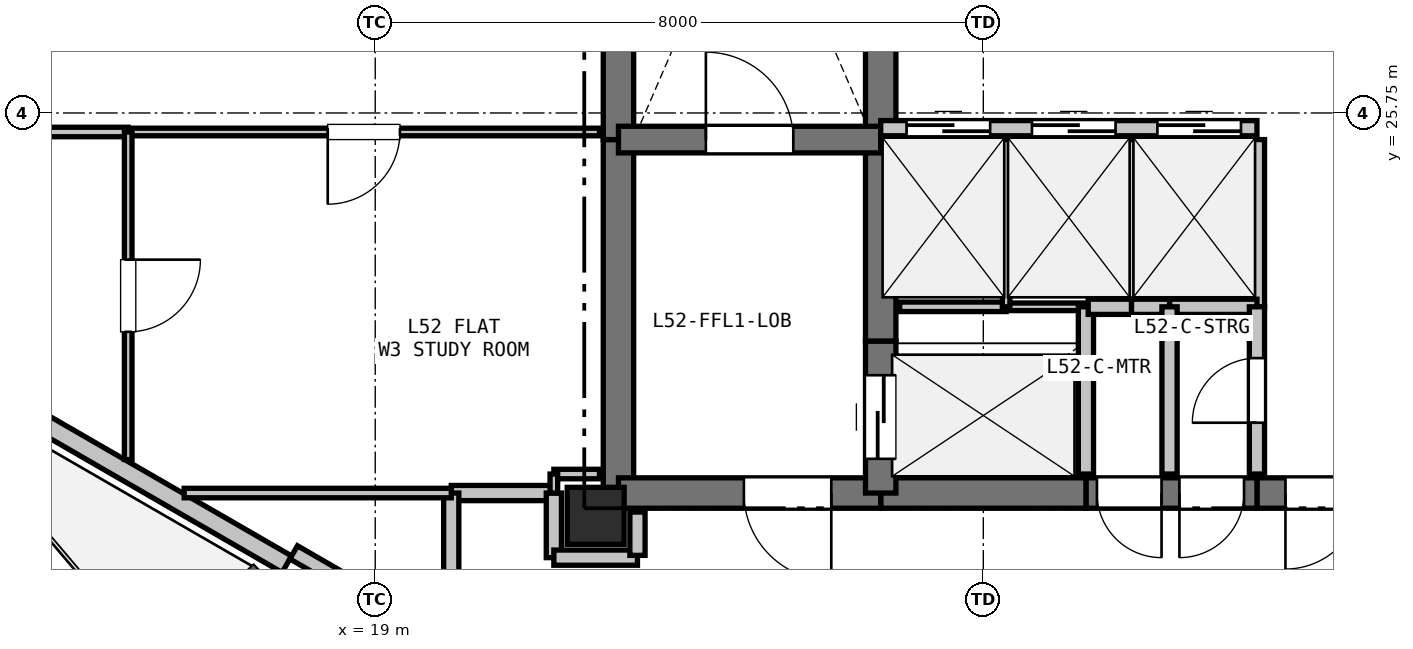
"""IFC4 building model, lengths in metres.
Left out: names, types, materials, properties, quantities, classifications, styles, units other than length and angle.
Written with IfcOpenShell. Run it as: python <this file> out.ifc"""

import sys

from ifc_helpers import new_model, si_unit, direction, frame, frame_2d, origin, origin_2d, place, context, subcontext, project, spatial, rectangle, extrude, element, fill, save


model = new_model("IFC4")
c1 = context("Model", 3, precision=1e-05, world=origin(), true_north=direction((0.0, 1.0)))
c2 = subcontext(c1, "Body", "Model", "MODEL_VIEW")
j1 = project(units=[si_unit("LENGTHUNIT", "METRE"), si_unit("PLANEANGLEUNIT", "RADIAN")], contexts=[c1])
p1 = place(None, origin())
s1 = spatial("IfcSite", under=j1, at=p1, CompositionType="ELEMENT")
p2 = place(p1, origin())
s2 = spatial("IfcBuilding", under=s1, at=p2, CompositionType="ELEMENT")
p3 = place(p2, frame((0.0, 0.0, 188.7)))
s3 = spatial("IfcBuildingStorey", under=s2, at=p3, CompositionType="ELEMENT", Elevation=188.7)
p4 = place(p3, frame((21.9, 20.45, 0.0), z_axis=(0.0, 0.0, 1.0), x_axis=(1.0, 0.0, 0.0)))
e1 = element("IfcColumn", 1, at=p4, inside=s3, PredefinedType="COLUMN", context=c2, shape_type="SweptSolid", body=[
    extrude(rectangle(XDim=0.75, YDim=0.75, at=origin_2d()), origin(), (0.0, 0.0, 1.0), 3.3),
])
p5 = place(p3, frame((17.837, 19.814, 0.0), z_axis=(0.0, 0.0, 1.0), x_axis=(-0.866027133173, 0.499997004599, 0.0)))
e2 = element("IfcWall", 2, at=p5, inside=s3, PredefinedType="SOLIDWALL", context=c2, shape_type="SweptSolid", body=[
    extrude(rectangle(XDim=9.699, YDim=0.25, at=frame_2d((4.849, 0.0))), origin(), (0.0, 0.0, 1.0), 2.69),
])
p6 = place(p5, frame((5.512, 0.0, 0.9)))
e3 = element("IfcOpeningElement", 3, at=p6, cuts=e2, PredefinedType="OPENING", context=c2, shape_type="SweptSolid", body=[
    extrude(rectangle(XDim=1.2, YDim=1.4, at=frame_2d((0.6, 0.7))), frame((0.0, 0.135, 0.0), z_axis=(0.0, -1.0, 0.0), x_axis=(1.0, 0.0, 0.0)), (0.0, 0.0, 1.0), 0.27),
])
p7 = place(p3, frame((19.399, 19.12, 0.0), z_axis=(0.0, 0.0, 1.0), x_axis=(-0.86605165483, 0.499954529098, 0.0)))
e4 = element("IfcWall", 4, at=p7, inside=s3, PredefinedType="PARAPET", context=c2, shape_type="SweptSolid", body=[
    extrude(rectangle(XDim=1.7, YDim=0.2, at=frame_2d((0.85, 0.0))), origin(), (0.0, 0.0, 1.0), 2.69),
])
p8 = place(p3, frame((22.2, 20.75, 0.0), z_axis=(0.0, 0.0, 1.0), x_axis=(0.0, 1.0, 0.0)))
e5 = element("IfcWall", 5, at=p8, inside=s3, PredefinedType="SHEAR", context=c2, shape_type="SweptSolid", body=[
    extrude(rectangle(XDim=4.65, YDim=0.4, at=frame_2d((2.325, 0.0))), origin(), (0.0, 0.0, 1.0), 3.07),
])
p9 = place(p3, frame((22.2, 25.4, 0.0), z_axis=(0.0, 0.0, 1.0), x_axis=(0.0, 1.0, 0.0)))
e6 = element("IfcWall", 6, at=p9, inside=s3, PredefinedType="SHEAR", context=c2, shape_type="SweptSolid", body=[
    extrude(rectangle(XDim=7.35, YDim=0.4, at=frame_2d((3.675, 0.0))), origin(), (0.0, 0.0, 1.0), 3.07),
])
p10 = place(p3, frame((32.35, 20.75, 0.0), z_axis=(0.0, 0.0, 1.0), x_axis=(-1.0, 0.0, 0.0)))
e7 = element("IfcWall", 7, at=p10, inside=s3, PredefinedType="SHEAR", context=c2, shape_type="SweptSolid", body=[
    extrude(rectangle(XDim=1.75, YDim=0.4, at=frame_2d((0.875, 0.0))), origin(), (0.0, 0.0, 1.0), 3.07),
])
p11 = place(p10, frame((0.375, 0.0, 0.0)))
e8 = element("IfcOpeningElement", 8, at=p11, cuts=e7, PredefinedType="OPENING", context=c2, shape_type="SweptSolid", body=[
    extrude(rectangle(XDim=1.0, YDim=2.15, at=frame_2d((0.5, 1.075))), frame((0.0, 0.21, 0.0), z_axis=(0.0, -1.0, 0.0), x_axis=(1.0, 0.0, 0.0)), (0.0, 0.0, 1.0), 0.42),
])
p12 = place(p3, frame((30.6, 20.75, 0.0), z_axis=(0.0, 0.0, 1.0), x_axis=(-1.0, 0.0, 0.0)))
e9 = element("IfcWall", 9, at=p12, inside=s3, PredefinedType="SHEAR", context=c2, shape_type="SweptSolid", body=[
    extrude(rectangle(XDim=2.25, YDim=0.4, at=frame_2d((1.125, 0.0))), origin(), (0.0, 0.0, 1.0), 3.07),
])
p13 = place(p12, frame((1.255, 0.0, 0.0)))
e10 = element("IfcOpeningElement", 10, at=p13, cuts=e9, PredefinedType="OPENING", context=c2, shape_type="SweptSolid", body=[
    extrude(rectangle(XDim=0.85, YDim=2.1, at=frame_2d((0.425, 1.05))), frame((0.0, 0.21, 0.0), z_axis=(0.0, -1.0, 0.0), x_axis=(1.0, 0.0, 0.0)), (0.0, 0.0, 1.0), 0.42),
])
p14 = place(p12, frame((0.17, 0.0, 0.0)))
e11 = element("IfcOpeningElement", 11, at=p14, cuts=e9, PredefinedType="OPENING", context=c2, shape_type="SweptSolid", body=[
    extrude(rectangle(XDim=0.85, YDim=2.1, at=frame_2d((0.425, 1.05))), frame((0.0, 0.21, 0.0), z_axis=(0.0, -1.0, 0.0), x_axis=(1.0, 0.0, 0.0)), (0.0, 0.0, 1.0), 0.42),
])
p15 = place(p3, frame((28.35, 20.75, 0.0), z_axis=(0.0, 0.0, 1.0), x_axis=(-1.0, 0.0, 0.0)))
e12 = element("IfcWall", 12, at=p15, inside=s3, PredefinedType="SHEAR", context=c2, shape_type="SweptSolid", body=[
    extrude(rectangle(XDim=2.7, YDim=0.4, at=frame_2d((1.35, 0.0))), origin(), (0.0, 0.0, 1.0), 3.07),
])
p16 = place(p3, frame((25.65, 20.75, 0.0), z_axis=(0.0, 0.0, 1.0), x_axis=(-1.0, 0.0, 0.0)))
e13 = element("IfcWall", 13, at=p16, inside=s3, PredefinedType="SHEAR", context=c2, shape_type="SweptSolid", body=[
    extrude(rectangle(XDim=3.45, YDim=0.4, at=frame_2d((1.725, 0.0))), origin(), (0.0, 0.0, 1.0), 3.07),
])
p17 = place(p16, frame((0.65, 0.0, 0.0)))
e14 = element("IfcOpeningElement", 14, at=p17, cuts=e13, PredefinedType="OPENING", context=c2, shape_type="SweptSolid", body=[
    extrude(rectangle(XDim=1.15, YDim=2.15, at=frame_2d((0.575, 1.075))), frame((0.0, 0.21, 0.0), z_axis=(0.0, -1.0, 0.0), x_axis=(1.0, 0.0, 0.0)), (0.0, 0.0, 1.0), 0.42),
])
p18 = place(p3, frame((25.65, 20.75, 0.0), z_axis=(0.0, 0.0, 1.0), x_axis=(0.0, 1.0, 0.0)))
e15 = element("IfcWall", 15, at=p18, inside=s3, PredefinedType="SHEAR", context=c2, shape_type="SweptSolid", body=[
    extrude(rectangle(XDim=2.0, YDim=0.4, at=frame_2d((1.0, 0.0))), origin(), (0.0, 0.0, 1.0), 3.07),
])
p19 = place(p18, frame((0.45, 0.0, 0.0)))
e16 = element("IfcOpeningElement", 16, at=p19, cuts=e15, PredefinedType="OPENING", context=c2, shape_type="SweptSolid", body=[
    extrude(rectangle(XDim=1.1, YDim=2.15, at=frame_2d((0.55, 1.075))), frame((0.0, 0.21, 0.0), z_axis=(0.0, -1.0, 0.0), x_axis=(1.0, 0.0, 0.0)), (0.0, 0.0, 1.0), 0.42),
])
p20 = place(p3, frame((25.65, 22.75, 0.0), z_axis=(0.0, 0.0, 1.0), x_axis=(0.0, 1.0, 0.0)))
e17 = element("IfcWall", 17, at=p20, inside=s3, PredefinedType="SHEAR", context=c2, shape_type="SweptSolid", body=[
    extrude(rectangle(XDim=2.8, YDim=0.4, at=frame_2d((1.4, 0.0))), origin(), (0.0, 0.0, 1.0), 3.07),
])
p21 = place(p3, frame((25.65, 25.55, 0.0), z_axis=(0.0, 0.0, 1.0), x_axis=(0.0, 1.0, 0.0)))
e18 = element("IfcWall", 18, at=p21, inside=s3, PredefinedType="SHEAR", context=c2, shape_type="SweptSolid", body=[
    extrude(rectangle(XDim=2.4, YDim=0.4, at=frame_2d((1.2, 0.0))), origin(), (0.0, 0.0, 1.0), 3.07),
])
p22 = place(p3, frame((22.2, 25.4, 0.0), z_axis=(0.0, 0.0, 1.0), x_axis=(1.0, 0.0, 0.0)))
e19 = element("IfcWall", 19, at=p22, inside=s3, PredefinedType="SHEAR", context=c2, shape_type="SweptSolid", body=[
    extrude(rectangle(XDim=3.45, YDim=0.35, at=frame_2d((1.725, 0.0))), origin(), (0.0, 0.0, 1.0), 3.07),
])
p23 = place(p22, frame((1.15, 0.0, 0.0)))
e20 = element("IfcOpeningElement", 20, at=p23, cuts=e19, PredefinedType="OPENING", context=c2, shape_type="SweptSolid", body=[
    extrude(rectangle(XDim=1.15, YDim=2.15, at=frame_2d((0.575, 1.075))), frame((0.0, 0.185, 0.0), z_axis=(0.0, -1.0, 0.0), x_axis=(1.0, 0.0, 0.0)), (0.0, 0.0, 1.0), 0.37),
])
p24 = place(p3, frame((25.65, 25.55, 0.0), z_axis=(0.0, 0.0, 1.0), x_axis=(1.0, 0.0, 0.0)))
e21 = element("IfcWall", 21, at=p24, inside=s3, PredefinedType="PARTITIONING", context=c2, shape_type="SweptSolid", body=[
    extrude(rectangle(XDim=4.95, YDim=0.2, at=frame_2d((2.475, 0.0))), origin(), (0.0, 0.0, 1.0), 3.07),
])
p25 = place(p24, frame((0.34, 0.0, 0.0)))
e22 = element("IfcOpeningElement", 22, at=p25, cuts=e21, PredefinedType="OPENING", context=c2, shape_type="SweptSolid", body=[
    extrude(rectangle(XDim=1.1, YDim=2.15, at=frame_2d((0.55, 1.075))), frame((0.0, 0.11, 0.0), z_axis=(0.0, -1.0, 0.0), x_axis=(1.0, 0.0, 0.0)), (0.0, 0.0, 1.0), 0.22),
])
p26 = place(p24, frame((1.99, 0.0, 0.0)))
e23 = element("IfcOpeningElement", 23, at=p26, cuts=e21, PredefinedType="OPENING", context=c2, shape_type="SweptSolid", body=[
    extrude(rectangle(XDim=1.1, YDim=2.15, at=frame_2d((0.55, 1.075))), frame((0.0, 0.11, 0.0), z_axis=(0.0, -1.0, 0.0), x_axis=(1.0, 0.0, 0.0)), (0.0, 0.0, 1.0), 0.22),
])
p27 = place(p24, frame((3.64, 0.0, 0.0)))
e24 = element("IfcOpeningElement", 24, at=p27, cuts=e21, PredefinedType="OPENING", context=c2, shape_type="SweptSolid", body=[
    extrude(rectangle(XDim=1.1, YDim=2.15, at=frame_2d((0.55, 1.075))), frame((0.0, 0.11, 0.0), z_axis=(0.0, -1.0, 0.0), x_axis=(1.0, 0.0, 0.0)), (0.0, 0.0, 1.0), 0.22),
])
p28 = place(p3, frame((25.9, 23.2, 0.0), z_axis=(0.0, 0.0, 1.0), x_axis=(1.0, 0.0, 0.0)))
e25 = element("IfcWall", 25, at=p28, inside=s3, PredefinedType="PARTITIONING", context=c2, shape_type="SweptSolid", body=[
    extrude(rectangle(XDim=1.4, YDim=0.125, at=frame_2d((0.7, 0.0))), origin(), (0.0, 0.0, 1.0), 3.07),
])
p29 = place(p3, frame((27.3, 23.2, 0.0), z_axis=(0.0, 0.0, 1.0), x_axis=(1.0, 0.0, 0.0)))
e26 = element("IfcWall", 26, at=p29, inside=s3, PredefinedType="PARTITIONING", context=c2, shape_type="SweptSolid", body=[
    extrude(rectangle(XDim=1.05, YDim=0.1, at=frame_2d((0.525, 0.0))), origin(), (0.0, 0.0, 1.0), 3.07),
])
p30 = place(p3, frame((28.35, 23.2, 0.0), z_axis=(0.0, 0.0, 1.0), x_axis=(0.0, -1.0, 0.0)))
e27 = element("IfcWall", 27, at=p30, inside=s3, PredefinedType="PARTITIONING", context=c2, shape_type="SweptSolid", body=[
    extrude(rectangle(XDim=2.2, YDim=0.2, at=frame_2d((1.1, 0.0))), origin(), (0.0, 0.0, 1.0), 3.07),
])
p31 = place(p3, frame((27.3, 25.4, 0.0), z_axis=(0.0, 0.0, 1.0), x_axis=(0.0, -1.0, 0.0)))
e28 = element("IfcWall", 28, at=p31, inside=s3, PredefinedType="PARTITIONING", context=c2, shape_type="SweptSolid", body=[
    extrude(rectangle(XDim=2.2, YDim=0.1, at=frame_2d((1.1, 0.0))), origin(), (0.0, 0.0, 1.0), 3.07),
])
p32 = place(p3, frame((28.95, 25.4, 0.0), z_axis=(0.0, 0.0, 1.0), x_axis=(0.0, -1.0, 0.0)))
e29 = element("IfcWall", 29, at=p32, inside=s3, PredefinedType="PARTITIONING", context=c2, shape_type="SweptSolid", body=[
    extrude(rectangle(XDim=2.2, YDim=0.125, at=frame_2d((1.1, 0.0))), origin(), (0.0, 0.0, 1.0), 3.07),
])
p33 = place(p3, frame((28.95, 23.2, 0.0), z_axis=(0.0, 0.0, 1.0), x_axis=(-1.0, 0.0, 0.0)))
e30 = element("IfcWall", 30, at=p33, inside=s3, PredefinedType="PARTITIONING", context=c2, shape_type="SweptSolid", body=[
    extrude(rectangle(XDim=0.57, YDim=0.2, at=frame_2d((0.285, 0.0))), origin(), (0.0, 0.0, 1.0), 3.07),
])
p34 = place(p3, frame((30.6, 25.4, 0.0), z_axis=(0.0, 0.0, 1.0), x_axis=(0.0, -1.0, 0.0)))
e31 = element("IfcWall", 31, at=p34, inside=s3, PredefinedType="PARTITIONING", context=c2, shape_type="SweptSolid", body=[
    extrude(rectangle(XDim=2.2, YDim=0.2, at=frame_2d((1.1, 0.0))), origin(), (0.0, 0.0, 1.0), 3.07),
])
p35 = place(p3, frame((30.6, 23.2, 0.0), z_axis=(0.0, 0.0, 1.0), x_axis=(-1.0, 0.0, 0.0)))
e32 = element("IfcWall", 32, at=p35, inside=s3, PredefinedType="PARTITIONING", context=c2, shape_type="SweptSolid", body=[
    extrude(rectangle(XDim=1.15, YDim=0.2, at=frame_2d((0.575, 0.0))), origin(), (0.0, 0.0, 1.0), 3.07),
])
p36 = place(p3, frame((29.45, 23.2, 0.0), z_axis=(0.0, 0.0, 1.0), x_axis=(-1.0, 0.0, 0.0)))
e33 = element("IfcWall", 33, at=p36, inside=s3, PredefinedType="PARTITIONING", context=c2, shape_type="SweptSolid", body=[
    extrude(rectangle(XDim=0.5, YDim=0.2, at=frame_2d((0.25, 0.0))), origin(), (0.0, 0.0, 1.0), 3.07),
])
p37 = place(p3, frame((30.6, 21.0, 0.0), z_axis=(0.0, 0.0, 1.0), x_axis=(0.0, 1.0, 0.0)))
e34 = element("IfcWall", 34, at=p37, inside=s3, PredefinedType="PARTITIONING", context=c2, shape_type="SweptSolid", body=[
    extrude(rectangle(XDim=2.2, YDim=0.2, at=frame_2d((1.1, 0.0))), origin(), (0.0, 0.0, 1.0), 3.07),
])
p38 = place(p37, frame((0.675, 0.0, 0.0)))
e35 = element("IfcOpeningElement", 35, at=p38, cuts=e34, PredefinedType="OPENING", context=c2, shape_type="SweptSolid", body=[
    extrude(rectangle(XDim=0.85, YDim=2.1, at=frame_2d((0.425, 1.05))), frame((0.0, 0.11, 0.0), z_axis=(0.0, -1.0, 0.0), x_axis=(1.0, 0.0, 0.0)), (0.0, 0.0, 1.0), 0.22),
])
p39 = place(p3, frame((20.0, 20.75, 0.0), z_axis=(0.0, 0.0, 1.0), x_axis=(1.0, 0.0, 0.0)))
e36 = element("IfcWall", 36, at=p39, inside=s3, PredefinedType="PARTITIONING", context=c2, shape_type="SweptSolid", body=[
    extrude(rectangle(XDim=1.35, YDim=0.2, at=frame_2d((0.675, 0.0))), origin(), (0.0, 0.0, 1.0), 2.518),
])
p40 = place(p3, frame((21.35, 20.75, 0.0), z_axis=(0.0, 0.0, 1.0), x_axis=(0.0, -1.0, 0.0)))
e37 = element("IfcWall", 37, at=p40, inside=s3, PredefinedType="PARTITIONING", context=c2, shape_type="SweptSolid", body=[
    extrude(rectangle(XDim=0.85, YDim=0.2, at=frame_2d((0.425, 0.0))), origin(), (0.0, 0.0, 1.0), 2.518),
])
p41 = place(p3, frame((21.35, 19.9, 0.0), z_axis=(0.0, 0.0, 1.0), x_axis=(1.0, 0.0, 0.0)))
e38 = element("IfcWall", 38, at=p41, inside=s3, PredefinedType="PARTITIONING", context=c2, shape_type="SweptSolid", body=[
    extrude(rectangle(XDim=1.1, YDim=0.2, at=frame_2d((0.55, 0.0))), origin(), (0.0, 0.0, 1.0), 2.518),
])
p42 = place(p3, frame((22.45, 19.93, 0.0), z_axis=(0.0, 0.0, 1.0), x_axis=(0.0, 1.0, 0.0)))
e39 = element("IfcWall", 39, at=p42, inside=s3, PredefinedType="PARTITIONING", context=c2, shape_type="SweptSolid", body=[
    extrude(rectangle(XDim=0.57, YDim=0.2, at=frame_2d((0.285, 0.0))), origin(), (0.0, 0.0, 1.0), 2.518),
])
p43 = place(p3, frame((20.0, 18.609, 0.0), z_axis=(0.0, 0.0, 1.0), x_axis=(0.0, 1.0, 0.0)))
e40 = element("IfcWall", 40, at=p43, inside=s3, PredefinedType="PARTITIONING", context=c2, shape_type="SweptSolid", body=[
    extrude(rectangle(XDim=2.141, YDim=0.2, at=frame_2d((1.071, 0.0))), origin(), (0.0, 0.0, 1.0), 2.365),
])
p44 = place(p3, frame((29.45, 23.2, 0.0), z_axis=(0.0, 0.0, 1.0), x_axis=(0.0, -1.0, 0.0)))
e41 = element("IfcWall", 41, at=p44, inside=s3, PredefinedType="PARTITIONING", context=c2, shape_type="SweptSolid", body=[
    extrude(rectangle(XDim=2.2, YDim=0.2, at=frame_2d((1.1, 0.0))), origin(), (0.0, 0.0, 1.0), 3.07),
])
p45 = place(p3, frame((21.95, 25.5, 0.0), z_axis=(0.0, 0.0, 1.0), x_axis=(-1.0, 0.0, 0.0)))
e42 = element("IfcWall", 42, at=p45, inside=s3, PredefinedType="PARTITIONING", context=c2, shape_type="SweptSolid", body=[
    extrude(rectangle(XDim=6.2, YDim=0.1, at=frame_2d((3.1, 0.0))), origin(), (0.0, 0.0, 1.0), 2.595),
])
p46 = place(p45, frame((2.625, 0.0, 0.0)))
e43 = element("IfcOpeningElement", 43, at=p46, cuts=e42, PredefinedType="OPENING", context=c2, shape_type="SweptSolid", body=[
    extrude(rectangle(XDim=0.95, YDim=2.1, at=frame_2d((0.475, 1.05))), frame((0.0, 0.06, 0.0), z_axis=(0.0, -1.0, 0.0), x_axis=(1.0, 0.0, 0.0)), (0.0, 0.0, 1.0), 0.12),
])
p47 = place(p3, frame((15.75, 25.5, 0.0), z_axis=(0.0, 0.0, 1.0), x_axis=(-1.0, 0.0, 0.0)))
e44 = element("IfcWall", 44, at=p47, inside=s3, PredefinedType="PARTITIONING", context=c2, shape_type="SweptSolid", body=[
    extrude(rectangle(XDim=6.293, YDim=0.125, at=frame_2d((3.147, 0.0))), origin(), (0.0, 0.0, 1.0), 2.735),
])
p48 = place(p47, frame((2.672, 0.0, 0.0)))
e45 = element("IfcOpeningElement", 45, at=p48, cuts=e44, PredefinedType="OPENING", context=c2, shape_type="SweptSolid", body=[
    extrude(rectangle(XDim=0.95, YDim=2.1, at=frame_2d((0.475, 1.05))), frame((0.0, 0.073, 0.0), z_axis=(0.0, -1.0, 0.0), x_axis=(1.0, 0.0, 0.0)), (0.0, 0.0, 1.0), 0.145),
])
p49 = place(p3, frame((15.75, 25.5, 0.0), z_axis=(0.0, 0.0, 1.0), x_axis=(0.0, -1.0, 0.0)))
e46 = element("IfcWall", 46, at=p49, inside=s3, PredefinedType="PARTITIONING", context=c2, shape_type="SweptSolid", body=[
    extrude(rectangle(XDim=4.309, YDim=0.1, at=frame_2d((2.155, 0.0))), origin(), (0.0, 0.0, 1.0), 2.365),
])
p50 = place(p49, frame((1.68, 0.0, 0.0)))
e47 = element("IfcOpeningElement", 47, at=p50, cuts=e46, PredefinedType="OPENING", context=c2, shape_type="SweptSolid", body=[
    extrude(rectangle(XDim=0.95, YDim=2.1, at=frame_2d((0.475, 1.05))), frame((0.0, 0.06, 0.0), z_axis=(0.0, -1.0, 0.0), x_axis=(1.0, 0.0, 0.0)), (0.0, 0.0, 1.0), 0.12),
])
p51 = place(p3, frame((21.95, 21.0, 0.0), z_axis=(0.0, 0.0, 1.0), x_axis=(-1.0, 0.0, 0.0)))
e48 = element("IfcWall", 48, at=p51, inside=s3, PredefinedType="PARTITIONING", context=c2, shape_type="SweptSolid", body=[
    extrude(rectangle(XDim=0.6, YDim=0.125, at=frame_2d((0.3, 0.0))), origin(), (0.0, 0.0, 1.0), 2.595),
])
p52 = place(p3, frame((21.35, 21.0, 0.0), z_axis=(0.0, 0.0, 1.0), x_axis=(0.0, -1.0, 0.0)))
e49 = element("IfcWall", 49, at=p52, inside=s3, PredefinedType="PARTITIONING", context=c2, shape_type="SweptSolid", body=[
    extrude(rectangle(XDim=0.25, YDim=0.1, at=frame_2d((0.125, 0.0))), origin(), (0.0, 0.0, 1.0), 2.518),
])
p53 = place(p3, frame((20.0, 20.75, 0.0), z_axis=(0.0, 0.0, 1.0), x_axis=(-1.0, 0.0, 0.0)))
e50 = element("IfcWall", 50, at=p53, inside=s3, PredefinedType="PARTITIONING", context=c2, shape_type="SweptSolid", body=[
    extrude(rectangle(XDim=3.514, YDim=0.125, at=frame_2d((1.757, 0.0))), origin(), (0.0, 0.0, 1.0), 2.365),
])
p54 = place(p25, origin())
e51 = element("IfcDoor", 51, at=p54, inside=s3, OperationType="SLIDING_TO_LEFT", PredefinedType="DOOR", context=c2, shape_type="SweptSolid", body=[
    extrude(rectangle(XDim=1.1, YDim=2.15, at=frame_2d((0.55, 1.075))), frame((0.0, 0.025, 0.0), z_axis=(0.0, -1.0, 0.0), x_axis=(1.0, 0.0, 0.0)), (0.0, 0.0, 1.0), 0.05),
])
fill(e22, e51)
p55 = place(p26, origin())
e52 = element("IfcDoor", 52, at=p55, inside=s3, OperationType="SLIDING_TO_LEFT", PredefinedType="DOOR", context=c2, shape_type="SweptSolid", body=[
    extrude(rectangle(XDim=1.1, YDim=2.15, at=frame_2d((0.55, 1.075))), frame((0.0, 0.025, 0.0), z_axis=(0.0, -1.0, 0.0), x_axis=(1.0, 0.0, 0.0)), (0.0, 0.0, 1.0), 0.05),
])
fill(e23, e52)
p56 = place(p27, origin())
e53 = element("IfcDoor", 53, at=p56, inside=s3, OperationType="SLIDING_TO_LEFT", PredefinedType="DOOR", context=c2, shape_type="SweptSolid", body=[
    extrude(rectangle(XDim=1.1, YDim=2.15, at=frame_2d((0.55, 1.075))), frame((0.0, 0.025, 0.0), z_axis=(0.0, -1.0, 0.0), x_axis=(1.0, 0.0, 0.0)), (0.0, 0.0, 1.0), 0.05),
])
fill(e24, e53)
p57 = place(p11, origin())
e54 = element("IfcDoor", 54, at=p57, inside=s3, OperationType="SINGLE_SWING_RIGHT", PredefinedType="DOOR", context=c2, shape_type="SweptSolid", body=[
    extrude(rectangle(XDim=1.0, YDim=2.15, at=frame_2d((0.5, 1.075))), frame((0.0, 0.025, 0.0), z_axis=(0.0, -1.0, 0.0), x_axis=(1.0, 0.0, 0.0)), (0.0, 0.0, 1.0), 0.05),
])
fill(e8, e54)
p58 = place(p19, origin())
e55 = element("IfcDoor", 55, at=p58, inside=s3, OperationType="SLIDING_TO_LEFT", PredefinedType="DOOR", context=c2, shape_type="SweptSolid", body=[
    extrude(rectangle(XDim=1.1, YDim=2.15, at=frame_2d((0.55, 1.075))), frame((0.0, 0.025, 0.0), z_axis=(0.0, -1.0, 0.0), x_axis=(1.0, 0.0, 0.0)), (0.0, 0.0, 1.0), 0.05),
])
fill(e16, e55)
p59 = place(p23, origin())
e56 = element("IfcDoor", 56, at=p59, inside=s3, OperationType="SINGLE_SWING_LEFT", PredefinedType="DOOR", context=c2, shape_type="SweptSolid", body=[
    extrude(rectangle(XDim=1.15, YDim=2.15, at=frame_2d((0.575, 1.075))), frame((0.0, 0.025, 0.0), z_axis=(0.0, -1.0, 0.0), x_axis=(1.0, 0.0, 0.0)), (0.0, 0.0, 1.0), 0.05),
])
fill(e20, e56)
p60 = place(p17, origin())
e57 = element("IfcDoor", 57, at=p60, inside=s3, OperationType="SINGLE_SWING_LEFT", PredefinedType="DOOR", context=c2, shape_type="SweptSolid", body=[
    extrude(rectangle(XDim=1.15, YDim=2.15, at=frame_2d((0.575, 1.075))), frame((0.0, 0.025, 0.0), z_axis=(0.0, -1.0, 0.0), x_axis=(1.0, 0.0, 0.0)), (0.0, 0.0, 1.0), 0.05),
])
fill(e14, e57)
p61 = place(p38, origin())
e58 = element("IfcDoor", 58, at=p61, inside=s3, OperationType="SINGLE_SWING_LEFT", PredefinedType="DOOR", context=c2, shape_type="SweptSolid", body=[
    extrude(rectangle(XDim=0.85, YDim=2.1, at=frame_2d((0.425, 1.05))), frame((0.0, 0.025, 0.0), z_axis=(0.0, -1.0, 0.0), x_axis=(1.0, 0.0, 0.0)), (0.0, 0.0, 1.0), 0.05),
])
fill(e35, e58)
p62 = place(p13, origin())
e59 = element("IfcDoor", 59, at=p62, inside=s3, OperationType="SINGLE_SWING_LEFT", PredefinedType="DOOR", context=c2, shape_type="SweptSolid", body=[
    extrude(rectangle(XDim=0.85, YDim=2.1, at=frame_2d((0.425, 1.05))), frame((0.0, 0.025, 0.0), z_axis=(0.0, -1.0, 0.0), x_axis=(1.0, 0.0, 0.0)), (0.0, 0.0, 1.0), 0.05),
])
fill(e10, e59)
p63 = place(p14, origin())
e60 = element("IfcDoor", 60, at=p63, inside=s3, OperationType="SINGLE_SWING_RIGHT", PredefinedType="DOOR", context=c2, shape_type="SweptSolid", body=[
    extrude(rectangle(XDim=0.85, YDim=2.1, at=frame_2d((0.425, 1.05))), frame((0.0, 0.025, 0.0), z_axis=(0.0, -1.0, 0.0), x_axis=(1.0, 0.0, 0.0)), (0.0, 0.0, 1.0), 0.05),
])
fill(e11, e60)
p64 = place(p46, origin())
e61 = element("IfcDoor", 61, at=p64, inside=s3, OperationType="SINGLE_SWING_RIGHT", PredefinedType="DOOR", context=c2, shape_type="SweptSolid", body=[
    extrude(rectangle(XDim=0.95, YDim=2.1, at=frame_2d((0.475, 1.05))), frame((0.0, 0.025, 0.0), z_axis=(0.0, -1.0, 0.0), x_axis=(1.0, 0.0, 0.0)), (0.0, 0.0, 1.0), 0.05),
])
fill(e43, e61)
p65 = place(p50, origin())
e62 = element("IfcDoor", 62, at=p65, inside=s3, OperationType="SINGLE_SWING_LEFT", PredefinedType="DOOR", context=c2, shape_type="SweptSolid", body=[
    extrude(rectangle(XDim=0.95, YDim=2.1, at=frame_2d((0.475, 1.05))), frame((0.0, 0.025, 0.0), z_axis=(0.0, -1.0, 0.0), x_axis=(1.0, 0.0, 0.0)), (0.0, 0.0, 1.0), 0.05),
])
fill(e47, e62)
save(model, sys.argv[1])
